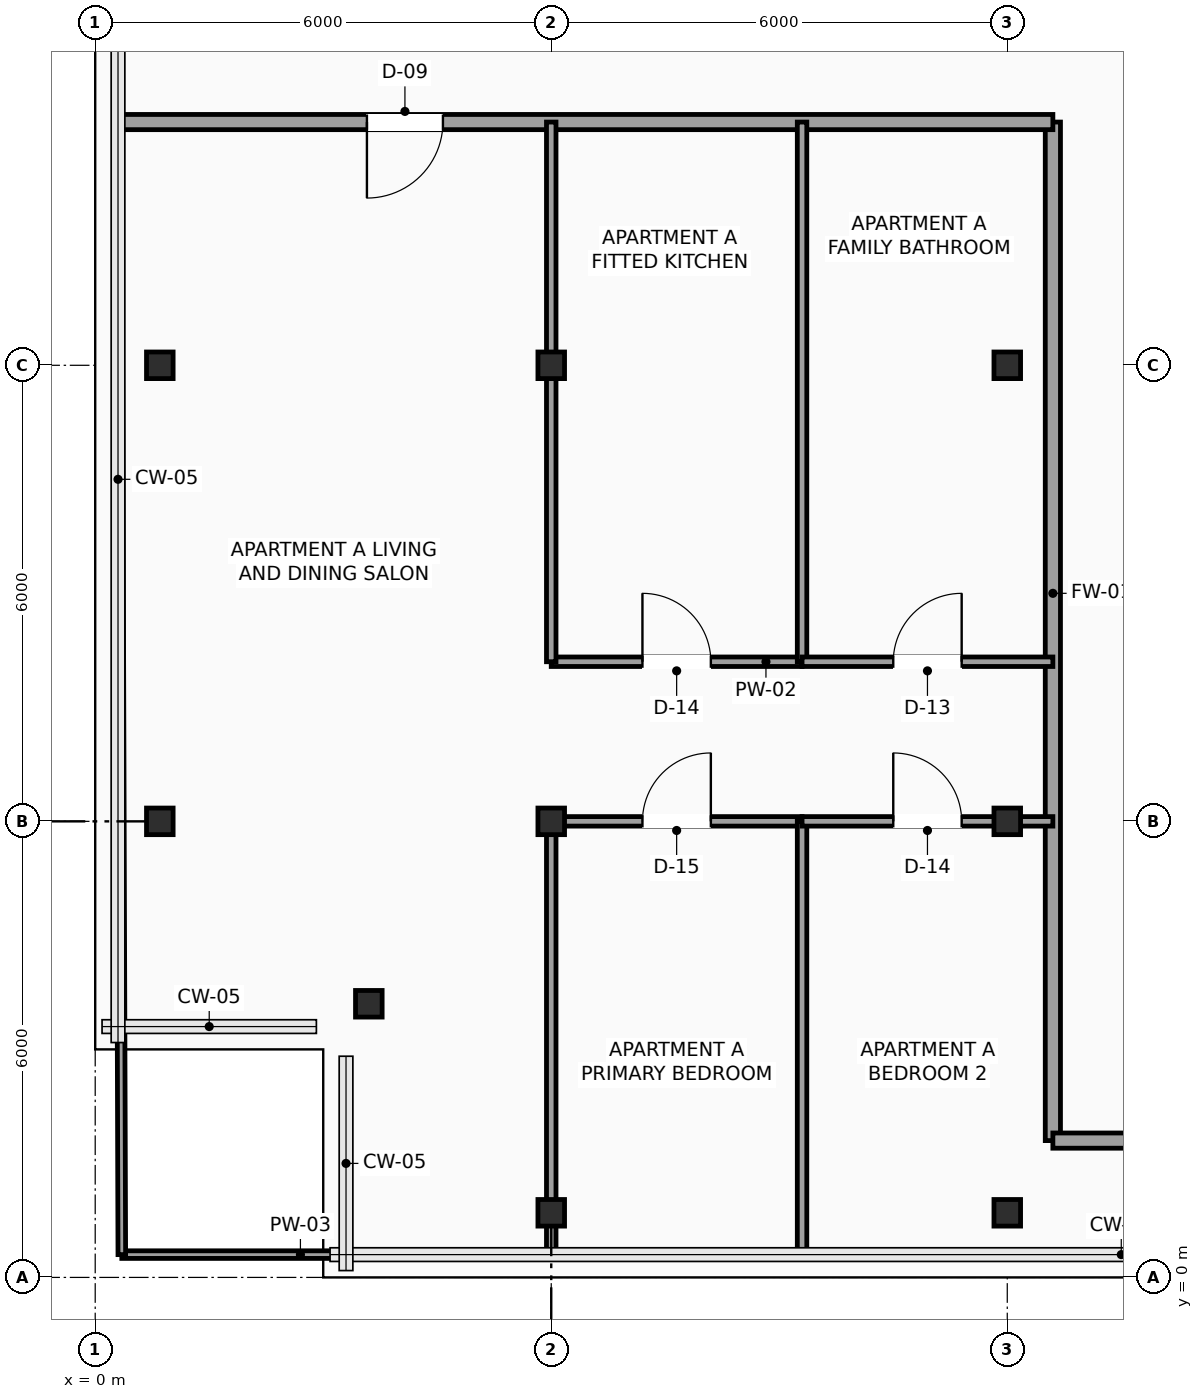
"""IFC4 building model, lengths in metres.
Left out: names, types, materials, properties, quantities, classifications, styles, units other than length and angle.
Written with IfcOpenShell. Run it as: python <this file> out.ifc"""

import sys

from ifc_helpers import new_model, si_unit, direction, frame, frame_2d, origin, origin_2d, place, context, subcontext, project, spatial, rectangle, hollow_rectangle, extrude, element, fill, save


model = new_model("IFC4")
c1 = context("Model", 3, precision=1e-05, world=origin(), true_north=direction((0.0, 1.0)))
c2 = subcontext(c1, "Body", "Model", "MODEL_VIEW")
j1 = project(units=[si_unit("LENGTHUNIT", "METRE"), si_unit("PLANEANGLEUNIT", "RADIAN")], contexts=[c1])
p1 = place(None, origin())
s1 = spatial("IfcSite", under=j1, at=p1, CompositionType="ELEMENT")
p2 = place(p1, origin())
s2 = spatial("IfcBuilding", under=s1, at=p2, CompositionType="ELEMENT")
p3 = place(p2, frame((0.0, 0.0, 257.2)))
s3 = spatial("IfcBuildingStorey", under=s2, at=p3, CompositionType="ELEMENT", Elevation=257.2)
for number, where, z_axis, x_axis in (
    (1, (3.6, 3.6, 0.0), (0.0, 0.0, 1.0), (1.0, 0.0, 0.0)),
    (2, (0.85, 6.0, 0.0), (0.0, 0.0, 1.0), (1.0, 0.0, 0.0)),
    (3, (0.85, 12.0, 0.0), (0.0, 0.0, 1.0), (1.0, 0.0, 0.0)),
    (4, (6.0, 0.85, 0.0), (0.0, 0.0, 1.0), (1.0, 0.0, 0.0)),
    (5, (6.0, 6.0, 0.0), (0.0, 0.0, 1.0), (1.0, 0.0, 0.0)),
    (6, (6.0, 12.0, 0.0), (0.0, 0.0, 1.0), (1.0, 0.0, 0.0)),
    (7, (12.0, 0.85, 0.0), (0.0, 0.0, 1.0), (1.0, 0.0, 0.0)),
    (8, (12.0, 6.0, 0.0), (0.0, 0.0, 1.0), (1.0, 0.0, 0.0)),
    (9, (12.0, 12.0, 0.0), (0.0, 0.0, 1.0), (1.0, 0.0, 0.0)),
):
    element("IfcColumn", number, at=place(p3, frame(where, z_axis=z_axis, x_axis=x_axis)), inside=s3, PredefinedType="COLUMN", context=c2, shape_type="SweptSolid", body=[
        extrude(hollow_rectangle(XDim=0.35, YDim=0.35, WallThickness=0.016, InnerFilletRadius=0.016, OuterFilletRadius=0.032, at=origin_2d()), origin(), (0.0, 0.0, 1.0), 3.5),
    ])
p4 = place(p3, frame((12.6, 1.8, 0.0), z_axis=(0.0, 0.0, 1.0), x_axis=(0.0, 1.0, 0.0)))
e10 = element("IfcWall", 10, at=p4, inside=s3, PredefinedType="SOLIDWALL", context=c2, shape_type="SweptSolid", body=[
    extrude(rectangle(XDim=13.4, YDim=0.2, at=frame_2d((6.7, 0.0))), origin(), (0.0, 0.0, 1.0), 3.3),
])
p5 = place(p3, frame((12.6, 15.2, 0.0), z_axis=(0.0, 0.0, 1.0), x_axis=(-1.0, 0.0, 0.0)))
e11 = element("IfcWall", 11, at=p5, inside=s3, PredefinedType="SOLIDWALL", context=c2, shape_type="SweptSolid", body=[
    extrude(rectangle(XDim=12.3, YDim=0.2, at=frame_2d((6.15, 0.0))), origin(), (0.0, 0.0, 1.0), 2.932),
])
p6 = place(p5, frame((8.025, 0.0, 0.0)))
e12 = element("IfcOpeningElement", 12, at=p6, cuts=e11, PredefinedType="OPENING", context=c2, shape_type="SweptSolid", body=[
    extrude(rectangle(XDim=1.0, YDim=2.2, at=frame_2d((0.5, 1.1))), frame((0.0, 0.11, 0.0), z_axis=(0.0, -1.0, 0.0), x_axis=(1.0, 0.0, 0.0)), (0.0, 0.0, 1.0), 0.22),
])
p7 = place(p3, frame((14.95, 1.8, 0.0), z_axis=(0.0, 0.0, 1.0), x_axis=(-1.0, 0.0, 0.0)))
e13 = element("IfcWall", 13, at=p7, inside=s3, PredefinedType="SOLIDWALL", context=c2, shape_type="SweptSolid", body=[
    extrude(rectangle(XDim=2.35, YDim=0.2, at=frame_2d((1.175, 0.0))), origin(), (0.0, 0.0, 1.0), 3.3),
])
p8 = place(p3, frame((0.35, 0.3, 0.0), z_axis=(0.0, 0.0, 1.0), x_axis=(1.0, 0.0, 0.0)))
e14 = element("IfcWall", 14, at=p8, inside=s3, PredefinedType="PARTITIONING", context=c2, shape_type="SweptSolid", body=[
    extrude(rectangle(XDim=12.25, YDim=0.1, at=frame_2d((6.125, 0.0))), origin(), (0.0, 0.0, 1.0), 3.3),
])
p9 = place(p3, frame((0.35, 0.3, 0.0), z_axis=(0.0, 0.0, 1.0), x_axis=(-0.003358984819, 0.999994358595, 0.0)))
e15 = element("IfcWall", 15, at=p9, inside=s3, PredefinedType="PARTITIONING", context=c2, shape_type="SweptSolid", body=[
    extrude(rectangle(XDim=14.9, YDim=0.1, at=frame_2d((7.45, 0.0))), origin(), (0.0, 0.0, 1.0), 3.3),
])
p10 = place(p3, frame((6.0, 8.1, 0.0), z_axis=(0.0, 0.0, 1.0), x_axis=(1.0, 0.0, 0.0)))
e16 = element("IfcWall", 16, at=p10, inside=s3, PredefinedType="PARTITIONING", context=c2, shape_type="SweptSolid", body=[
    extrude(rectangle(XDim=3.3, YDim=0.125, at=frame_2d((1.65, 0.0))), origin(), (0.0, 0.0, 1.0), 3.3),
])
p11 = place(p10, frame((1.2, 0.0, 0.0)))
e17 = element("IfcOpeningElement", 17, at=p11, cuts=e16, PredefinedType="OPENING", context=c2, shape_type="SweptSolid", body=[
    extrude(rectangle(XDim=0.9, YDim=2.1, at=frame_2d((0.45, 1.05))), frame((0.0, 0.073, 0.0), z_axis=(0.0, -1.0, 0.0), x_axis=(1.0, 0.0, 0.0)), (0.0, 0.0, 1.0), 0.145),
])
p12 = place(p3, frame((6.0, 8.1, 0.0), z_axis=(0.0, 0.0, 1.0), x_axis=(0.0, 1.0, 0.0)))
e18 = element("IfcWall", 18, at=p12, inside=s3, PredefinedType="PARTITIONING", context=c2, shape_type="SweptSolid", body=[
    extrude(rectangle(XDim=7.1, YDim=0.125, at=frame_2d((3.55, 0.0))), origin(), (0.0, 0.0, 1.0), 2.992),
])
p13 = place(p3, frame((9.3, 8.1, 0.0), z_axis=(0.0, 0.0, 1.0), x_axis=(0.0, 1.0, 0.0)))
e19 = element("IfcWall", 19, at=p13, inside=s3, PredefinedType="PARTITIONING", context=c2, shape_type="SweptSolid", body=[
    extrude(rectangle(XDim=7.1, YDim=0.125, at=frame_2d((3.55, 0.0))), origin(), (0.0, 0.0, 1.0), 3.3),
])
p14 = place(p3, frame((9.3, 8.1, 0.0), z_axis=(0.0, 0.0, 1.0), x_axis=(1.0, 0.0, 0.0)))
e20 = element("IfcWall", 20, at=p14, inside=s3, PredefinedType="PARTITIONING", context=c2, shape_type="SweptSolid", body=[
    extrude(rectangle(XDim=3.3, YDim=0.125, at=frame_2d((1.65, 0.0))), origin(), (0.0, 0.0, 1.0), 3.3),
])
p15 = place(p14, frame((1.2, 0.0, 0.0)))
e21 = element("IfcOpeningElement", 21, at=p15, cuts=e20, PredefinedType="OPENING", context=c2, shape_type="SweptSolid", body=[
    extrude(rectangle(XDim=0.9, YDim=2.1, at=frame_2d((0.45, 1.05))), frame((0.0, 0.073, 0.0), z_axis=(0.0, -1.0, 0.0), x_axis=(1.0, 0.0, 0.0)), (0.0, 0.0, 1.0), 0.145),
])
p16 = place(p3, frame((6.0, 6.0, 0.0), z_axis=(0.0, 0.0, 1.0), x_axis=(1.0, 0.0, 0.0)))
e22 = element("IfcWall", 22, at=p16, inside=s3, PredefinedType="PARTITIONING", context=c2, shape_type="SweptSolid", body=[
    extrude(rectangle(XDim=3.3, YDim=0.125, at=frame_2d((1.65, 0.0))), origin(), (0.0, 0.0, 1.0), 2.992),
])
p17 = place(p16, frame((1.2, 0.0, 0.0)))
e23 = element("IfcOpeningElement", 23, at=p17, cuts=e22, PredefinedType="OPENING", context=c2, shape_type="SweptSolid", body=[
    extrude(rectangle(XDim=0.9, YDim=2.1, at=frame_2d((0.45, 1.05))), frame((0.0, 0.073, 0.0), z_axis=(0.0, -1.0, 0.0), x_axis=(1.0, 0.0, 0.0)), (0.0, 0.0, 1.0), 0.145),
])
p18 = place(p3, frame((6.0, 0.3, 0.0), z_axis=(0.0, 0.0, 1.0), x_axis=(0.0, 1.0, 0.0)))
e24 = element("IfcWall", 24, at=p18, inside=s3, PredefinedType="PARTITIONING", context=c2, shape_type="SweptSolid", body=[
    extrude(rectangle(XDim=5.7, YDim=0.125, at=frame_2d((2.85, 0.0))), origin(), (0.0, 0.0, 1.0), 2.992),
])
p19 = place(p3, frame((9.3, 0.3, 0.0), z_axis=(0.0, 0.0, 1.0), x_axis=(0.0, 1.0, 0.0)))
e25 = element("IfcWall", 25, at=p19, inside=s3, PredefinedType="PARTITIONING", context=c2, shape_type="SweptSolid", body=[
    extrude(rectangle(XDim=5.7, YDim=0.125, at=frame_2d((2.85, 0.0))), origin(), (0.0, 0.0, 1.0), 3.3),
])
p20 = place(p3, frame((9.3, 6.0, 0.0), z_axis=(0.0, 0.0, 1.0), x_axis=(1.0, 0.0, 0.0)))
e26 = element("IfcWall", 26, at=p20, inside=s3, PredefinedType="PARTITIONING", context=c2, shape_type="SweptSolid", body=[
    extrude(rectangle(XDim=3.3, YDim=0.125, at=frame_2d((1.65, 0.0))), origin(), (0.0, 0.0, 1.0), 2.992),
])
p21 = place(p20, frame((1.2, 0.0, 0.0)))
e27 = element("IfcOpeningElement", 27, at=p21, cuts=e26, PredefinedType="OPENING", context=c2, shape_type="SweptSolid", body=[
    extrude(rectangle(XDim=0.9, YDim=2.1, at=frame_2d((0.45, 1.05))), frame((0.0, 0.073, 0.0), z_axis=(0.0, -1.0, 0.0), x_axis=(1.0, 0.0, 0.0)), (0.0, 0.0, 1.0), 0.145),
])
p22 = place(p6, origin())
e28 = element("IfcDoor", 28, at=p22, inside=s3, OperationType="SINGLE_SWING_RIGHT", PredefinedType="DOOR", context=c2, shape_type="SweptSolid", body=[
    extrude(rectangle(XDim=1.0, YDim=2.2, at=frame_2d((0.5, 1.1))), frame((0.0, 0.025, 0.0), z_axis=(0.0, -1.0, 0.0), x_axis=(1.0, 0.0, 0.0)), (0.0, 0.0, 1.0), 0.05),
])
fill(e12, e28)
p23 = place(p11, origin())
e29 = element("IfcDoor", 29, at=p23, inside=s3, OperationType="SINGLE_SWING_LEFT", PredefinedType="DOOR", context=c2, shape_type="SweptSolid", body=[
    extrude(rectangle(XDim=0.9, YDim=2.1, at=frame_2d((0.45, 1.05))), frame((0.0, 0.025, 0.0), z_axis=(0.0, -1.0, 0.0), x_axis=(1.0, 0.0, 0.0)), (0.0, 0.0, 1.0), 0.05),
])
fill(e17, e29)
p24 = place(p15, origin())
e30 = element("IfcDoor", 30, at=p24, inside=s3, OperationType="SINGLE_SWING_RIGHT", PredefinedType="DOOR", context=c2, shape_type="SweptSolid", body=[
    extrude(rectangle(XDim=0.9, YDim=2.1, at=frame_2d((0.45, 1.05))), frame((0.0, 0.025, 0.0), z_axis=(0.0, -1.0, 0.0), x_axis=(1.0, 0.0, 0.0)), (0.0, 0.0, 1.0), 0.05),
])
fill(e21, e30)
p25 = place(p17, origin())
e31 = element("IfcDoor", 31, at=p25, inside=s3, OperationType="SINGLE_SWING_RIGHT", PredefinedType="DOOR", context=c2, shape_type="SweptSolid", body=[
    extrude(rectangle(XDim=0.9, YDim=2.1, at=frame_2d((0.45, 1.05))), frame((0.0, 0.025, 0.0), z_axis=(0.0, -1.0, 0.0), x_axis=(1.0, 0.0, 0.0)), (0.0, 0.0, 1.0), 0.05),
])
fill(e23, e31)
p26 = place(p21, origin())
e32 = element("IfcDoor", 32, at=p26, inside=s3, OperationType="SINGLE_SWING_LEFT", PredefinedType="DOOR", context=c2, shape_type="SweptSolid", body=[
    extrude(rectangle(XDim=0.9, YDim=2.1, at=frame_2d((0.45, 1.05))), frame((0.0, 0.025, 0.0), z_axis=(0.0, -1.0, 0.0), x_axis=(1.0, 0.0, 0.0)), (0.0, 0.0, 1.0), 0.05),
])
fill(e27, e32)
save(model, sys.argv[1])
